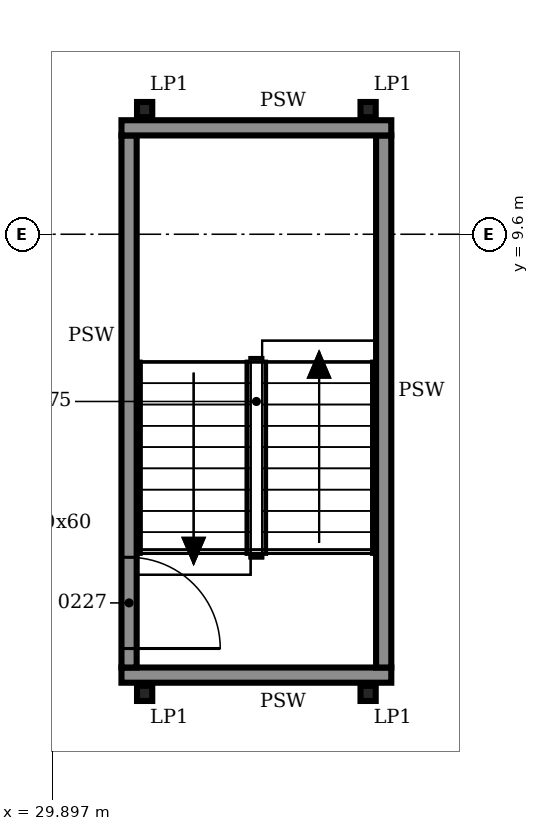
"""IFC4 building model, lengths in metres.
Left out: names, types, materials, properties, quantities, classifications, styles, units other than length and angle.
Written with IfcOpenShell. Run it as: python <this file> out.ifc"""

import sys

from ifc_helpers import new_model, si_unit, direction, frame, frame_2d, origin, origin_2d, place, context, subcontext, project, spatial, rectangle, i_section, extrude, element, fill, save


model = new_model("IFC4")
c1 = context("Model", 3, precision=1e-05, world=origin(), true_north=direction((0.0, 1.0)))
c2 = subcontext(c1, "Body", "Model", "MODEL_VIEW")
j1 = project(units=[si_unit("LENGTHUNIT", "METRE"), si_unit("PLANEANGLEUNIT", "RADIAN")], contexts=[c1])
p1 = place(None, origin())
s1 = spatial("IfcSite", under=j1, at=p1, CompositionType="ELEMENT")
p2 = place(p1, origin())
s2 = spatial("IfcBuilding", under=s1, at=p2, CompositionType="ELEMENT")
p3 = place(p2, frame((0.0, 0.0, 15.0)))
s3 = spatial("IfcBuildingStorey", under=s2, at=p3, CompositionType="ELEMENT", Elevation=15.0)
for number, where, z_axis, x_axis in (
    (1, (31.105, 11.24, 0.0), (0.0, 0.0, 1.0), (1.0, 0.0, 0.0)),
    (2, (34.045, 11.24, 0.0), (0.0, 0.0, 1.0), (1.0, 0.0, 0.0)),
):
    element("IfcColumn", number, at=place(p3, frame(where, z_axis=z_axis, x_axis=x_axis)), inside=s3, PredefinedType="COLUMN", context=c2, shape_type="SweptSolid", body=[
        extrude(i_section(OverallWidth=0.2, OverallDepth=0.2, WebThickness=0.009, FlangeThickness=0.015, FilletRadius=0.018, at=origin_2d()), origin(), (0.0, 0.0, 1.0), 6.0),
    ])
for number, where, z_axis, x_axis in (
    (3, (31.105, 3.56, 0.0), (0.0, 0.0, 1.0), (1.0, 0.0, 0.0)),
    (4, (34.045, 3.56, 0.0), (0.0, 0.0, 1.0), (1.0, 0.0, 0.0)),
):
    element("IfcColumn", number, at=place(p3, frame(where, z_axis=z_axis, x_axis=x_axis)), inside=s3, PredefinedType="COLUMN", context=c2, shape_type="SweptSolid", body=[
        extrude(i_section(OverallWidth=0.2, OverallDepth=0.2, WebThickness=0.009, FlangeThickness=0.015, FilletRadius=0.018, at=origin_2d()), origin(), (0.0, 0.0, 1.0), 2.8),
    ])
p4 = place(p3, frame((30.8, 3.8, 0.0), z_axis=(0.0, 0.0, 1.0), x_axis=(1.0, 0.0, 0.0)))
e5 = element("IfcWall", 5, at=p4, inside=s3, PredefinedType="SOLIDWALL", context=c2, shape_type="SweptSolid", body=[
    extrude(rectangle(XDim=3.55, YDim=0.2, at=frame_2d((1.775, 0.0))), origin(), (0.0, 0.0, 1.0), 5.8),
])
p5 = place(p3, frame((30.9, 3.9, 0.0), z_axis=(0.0, 0.0, 1.0), x_axis=(0.0, 1.0, 0.0)))
e6 = element("IfcWall", 6, at=p5, inside=s3, PredefinedType="SOLIDWALL", context=c2, shape_type="SweptSolid", body=[
    extrude(rectangle(XDim=7.0, YDim=0.2, at=frame_2d((3.5, 0.0))), origin(), (0.0, 0.0, 1.0), 5.8),
])
p6 = place(p5, frame((0.25, 0.0, 0.0)))
e7 = element("IfcOpeningElement", 7, at=p6, cuts=e6, PredefinedType="OPENING", context=c2, shape_type="SweptSolid", body=[
    extrude(rectangle(XDim=1.2, YDim=2.1, at=frame_2d((0.6, 1.05))), frame((0.0, 0.11, 0.0), z_axis=(0.0, -1.0, 0.0), x_axis=(1.0, 0.0, 0.0)), (0.0, 0.0, 1.0), 0.22),
])
p7 = place(p3, frame((34.25, 3.9, 0.0), z_axis=(0.0, 0.0, 1.0), x_axis=(0.0, 1.0, 0.0)))
e8 = element("IfcWall", 8, at=p7, inside=s3, PredefinedType="SOLIDWALL", context=c2, shape_type="SweptSolid", body=[
    extrude(rectangle(XDim=7.0, YDim=0.2, at=frame_2d((3.5, 0.0))), origin(), (0.0, 0.0, 1.0), 5.8),
])
p8 = place(p3, frame((30.8, 11.0, 0.0), z_axis=(0.0, 0.0, 1.0), x_axis=(1.0, 0.0, 0.0)))
e9 = element("IfcWall", 9, at=p8, inside=s3, PredefinedType="SOLIDWALL", context=c2, shape_type="SweptSolid", body=[
    extrude(rectangle(XDim=3.55, YDim=0.2, at=frame_2d((1.775, 0.0))), origin(), (0.0, 0.0, 1.0), 5.8),
])
p9 = place(p6, frame((1.2, 0.0, 0.0), z_axis=(0.0, 0.0, 1.0), x_axis=(-1.0, 0.0, 0.0)))
e10 = element("IfcDoor", 10, at=p9, inside=s3, OperationType="SINGLE_SWING_RIGHT", PredefinedType="DOOR", context=c2, shape_type="SweptSolid", body=[
    extrude(rectangle(XDim=1.2, YDim=2.1, at=frame_2d((0.6, 1.05))), frame((0.0, 0.025, 0.0), z_axis=(0.0, -1.0, 0.0), x_axis=(1.0, 0.0, 0.0)), (0.0, 0.0, 1.0), 0.05),
])
fill(e7, e10)
save(model, sys.argv[1])
